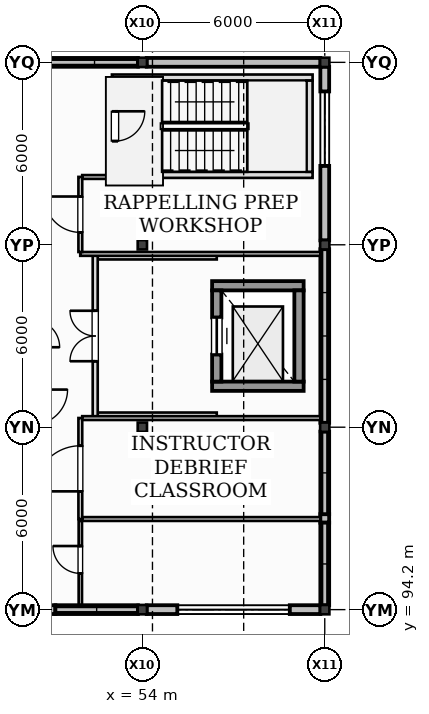
"""IFC4 building model, lengths in metres.
Left out: names, types, materials, properties, quantities, classifications, styles, units other than length and angle.
Written with IfcOpenShell. Run it as: python <this file> out.ifc"""

import sys

from ifc_helpers import new_model, si_unit, direction, frame, frame_2d, origin, origin_2d, place, context, subcontext, project, spatial, rectangle, i_section, extrude, element, fill, save


model = new_model("IFC4")
c1 = context("Model", 3, precision=1e-05, world=origin(), true_north=direction((0.0, 1.0)))
c2 = subcontext(c1, "Body", "Model", "MODEL_VIEW")
j1 = project(units=[si_unit("LENGTHUNIT", "METRE"), si_unit("PLANEANGLEUNIT", "RADIAN")], contexts=[c1])
p1 = place(None, origin())
s1 = spatial("IfcSite", under=j1, at=p1, CompositionType="ELEMENT")
p2 = place(p1, origin())
s2 = spatial("IfcBuilding", under=s1, at=p2, CompositionType="ELEMENT")
p3 = place(p2, frame((0.0, 0.0, 21.6)))
s3 = spatial("IfcBuildingStorey", under=s2, at=p3, CompositionType="ELEMENT", Elevation=21.6)
for number, where, z_axis, x_axis in (
    (1, (54.0, 94.2, 0.0), (0.0, 0.0, 1.0), (1.0, 0.0, 0.0)),
    (2, (54.0, 100.2, 0.0), (0.0, 0.0, 1.0), (1.0, 0.0, 0.0)),
    (3, (54.0, 106.2, 0.0), (0.0, 0.0, 1.0), (1.0, 0.0, 0.0)),
    (4, (54.0, 112.2, 0.0), (0.0, 0.0, 1.0), (1.0, 0.0, 0.0)),
    (5, (60.0, 94.2, 0.0), (0.0, 0.0, 1.0), (1.0, 0.0, 0.0)),
    (6, (60.0, 100.2, 0.0), (0.0, 0.0, 1.0), (1.0, 0.0, 0.0)),
    (7, (60.0, 106.2, 0.0), (0.0, 0.0, 1.0), (1.0, 0.0, 0.0)),
    (8, (60.0, 112.2, 0.0), (0.0, 0.0, 1.0), (1.0, 0.0, 0.0)),
):
    element("IfcColumn", number, at=place(p3, frame(where, z_axis=z_axis, x_axis=x_axis)), inside=s3, PredefinedType="COLUMN", context=c2, shape_type="SweptSolid", body=[
        extrude(i_section(OverallWidth=0.305, OverallDepth=0.308, WebThickness=0.01, FlangeThickness=0.015, at=origin_2d()), origin(), (0.0, 0.0, 1.0), 3.6),
    ])
p4 = place(p3, frame((50.86, 94.2, 0.0), z_axis=(0.0, 0.0, 1.0), x_axis=(1.0, 0.0, 0.0)))
e9 = element("IfcWall", 9, at=p4, inside=s3, PredefinedType="STANDARD", context=c2, shape_type="SweptSolid", body=[
    extrude(rectangle(XDim=0.28, YDim=0.29, at=frame_2d((0.14, 0.0))), origin(), (0.0, 0.0, 1.0), 3.6),
])
p5 = place(p3, frame((51.14, 94.2, 0.0), z_axis=(0.0, 0.0, 1.0), x_axis=(1.0, 0.0, 0.0)))
e10 = element("IfcWall", 10, at=p5, inside=s3, PredefinedType="STANDARD", context=c2, shape_type="SweptSolid", body=[
    extrude(rectangle(XDim=2.715, YDim=0.29, at=frame_2d((1.357, 0.0))), origin(), (0.0, 0.0, 1.0), 0.56),
])
p6 = place(p3, frame((54.145, 94.2, 0.0), z_axis=(0.0, 0.0, 1.0), x_axis=(1.0, 0.0, 0.0)))
e11 = element("IfcWall", 11, at=p6, inside=s3, PredefinedType="STANDARD", context=c2, shape_type="SweptSolid", body=[
    extrude(rectangle(XDim=5.71, YDim=0.29, at=frame_2d((2.855, 0.0))), origin(), (0.0, 0.0, 1.0), 3.6),
])
p7 = place(p6, frame((1.005, 0.0, 1.0)))
e12 = element("IfcOpeningElement", 12, at=p7, cuts=e11, PredefinedType="OPENING", context=c2, shape_type="SweptSolid", body=[
    extrude(rectangle(XDim=3.7, YDim=0.88, at=frame_2d((1.85, 0.44))), frame((0.0, 0.155, 0.0), z_axis=(0.0, -1.0, 0.0), x_axis=(1.0, 0.0, 0.0)), (0.0, 0.0, 1.0), 0.31),
])
p8 = place(p3, frame((53.855, 112.2, 0.0), z_axis=(0.0, 0.0, 1.0), x_axis=(-1.0, 0.0, 0.0)))
e13 = element("IfcWall", 13, at=p8, inside=s3, PredefinedType="STANDARD", context=c2, shape_type="SweptSolid", body=[
    extrude(rectangle(XDim=5.71, YDim=0.29, at=frame_2d((2.855, 0.0))), origin(), (0.0, 0.0, 1.0), 0.92),
])
p9 = place(p3, frame((59.855, 112.2, 0.0), z_axis=(0.0, 0.0, 1.0), x_axis=(-1.0, 0.0, 0.0)))
e14 = element("IfcWall", 14, at=p9, inside=s3, PredefinedType="STANDARD", context=c2, shape_type="SweptSolid", body=[
    extrude(rectangle(XDim=5.71, YDim=0.29, at=frame_2d((2.855, 0.0))), origin(), (0.0, 0.0, 1.0), 3.6),
])
p10 = place(p3, frame((60.0, 97.06, 0.0), z_axis=(0.0, 0.0, 1.0), x_axis=(0.0, 1.0, 0.0)))
e15 = element("IfcWall", 15, at=p10, inside=s3, PredefinedType="STANDARD", context=c2, shape_type="SweptSolid", body=[
    extrude(rectangle(XDim=0.28, YDim=0.29, at=frame_2d((0.14, 0.0))), origin(), (0.0, 0.0, 1.0), 2.813),
])
p11 = place(p3, frame((60.0, 94.345, 0.0), z_axis=(0.0, 0.0, 1.0), x_axis=(0.0, 1.0, 0.0)))
e16 = element("IfcWall", 16, at=p11, inside=s3, PredefinedType="STANDARD", context=c2, shape_type="SweptSolid", body=[
    extrude(rectangle(XDim=2.715, YDim=0.29, at=frame_2d((1.357, 0.0))), origin(), (0.0, 0.0, 1.0), 0.56),
])
p12 = place(p3, frame((60.0, 97.34, 0.0), z_axis=(0.0, 0.0, 1.0), x_axis=(0.0, 1.0, 0.0)))
e17 = element("IfcWall", 17, at=p12, inside=s3, PredefinedType="STANDARD", context=c2, shape_type="SweptSolid", body=[
    extrude(rectangle(XDim=2.715, YDim=0.29, at=frame_2d((1.357, 0.0))), origin(), (0.0, 0.0, 1.0), 0.68),
])
p13 = place(p3, frame((60.0, 100.345, 0.0), z_axis=(0.0, 0.0, 1.0), x_axis=(0.0, 1.0, 0.0)))
e18 = element("IfcWall", 18, at=p13, inside=s3, PredefinedType="STANDARD", context=c2, shape_type="SweptSolid", body=[
    extrude(rectangle(XDim=5.71, YDim=0.29, at=frame_2d((2.855, 0.0))), origin(), (0.0, 0.0, 1.0), 0.8),
])
p14 = place(p3, frame((60.0, 106.345, 0.0), z_axis=(0.0, 0.0, 1.0), x_axis=(0.0, 1.0, 0.0)))
e19 = element("IfcWall", 19, at=p14, inside=s3, PredefinedType="STANDARD", context=c2, shape_type="SweptSolid", body=[
    extrude(rectangle(XDim=5.71, YDim=0.29, at=frame_2d((2.855, 0.0))), origin(), (0.0, 0.0, 1.0), 3.6),
])
p15 = place(p14, frame((2.449, 0.0, 1.0)))
e20 = element("IfcOpeningElement", 20, at=p15, cuts=e19, PredefinedType="OPENING", context=c2, shape_type="SweptSolid", body=[
    extrude(rectangle(XDim=2.45, YDim=1.08, at=frame_2d((1.225, 0.54))), frame((0.0, 0.155, 0.0), z_axis=(0.0, -1.0, 0.0), x_axis=(1.0, 0.0, 0.0)), (0.0, 0.0, 1.0), 0.31),
])
for number, where, z_axis, x_axis in (
    (21, (53.0, 108.5, 0.0), (0.0, 0.0, 1.0), (1.0, 0.0, 0.0)),
    (22, (59.6, 111.7, 0.0), (0.0, 0.0, 1.0), (-1.0, 0.0, 0.0)),
):
    element("IfcWall", number, at=place(p3, frame(where, z_axis=z_axis, x_axis=x_axis)), inside=s3, PredefinedType="PARTITIONING", context=c2, shape_type="SweptSolid", body=[
        extrude(rectangle(XDim=6.6, YDim=0.2, at=frame_2d((3.3, 0.0))), origin(), (0.0, 0.0, 1.0), 2.89),
    ])
p16 = place(p3, frame((53.1, 111.6, 0.0), z_axis=(0.0, 0.0, 1.0), x_axis=(0.0, -1.0, 0.0)))
e23 = element("IfcWall", 23, at=p16, inside=s3, PredefinedType="PARTITIONING", context=c2, shape_type="SweptSolid", body=[
    extrude(rectangle(XDim=3.0, YDim=0.2, at=frame_2d((1.5, 0.0))), origin(), (0.0, 0.0, 1.0), 2.89),
])
p17 = place(p16, frame((1.01, 0.0, 0.0)))
e24 = element("IfcOpeningElement", 24, at=p17, cuts=e23, PredefinedType="OPENING", context=c2, shape_type="SweptSolid", body=[
    extrude(rectangle(XDim=0.98, YDim=2.15, at=frame_2d((0.49, 1.075))), frame((0.0, 0.11, 0.0), z_axis=(0.0, -1.0, 0.0), x_axis=(1.0, 0.0, 0.0)), (0.0, 0.0, 1.0), 0.22),
])
p18 = place(p3, frame((59.5, 108.6, 0.0), z_axis=(0.0, 0.0, 1.0), x_axis=(0.0, 1.0, 0.0)))
e25 = element("IfcWall", 25, at=p18, inside=s3, PredefinedType="PARTITIONING", context=c2, shape_type="SweptSolid", body=[
    extrude(rectangle(XDim=3.0, YDim=0.2, at=frame_2d((1.5, 0.0))), origin(), (0.0, 0.0, 1.0), 2.89),
])
for number, where, z_axis, x_axis in (
    (26, (56.295, 101.548, 0.0), (0.0, 0.0, 1.0), (1.0, 0.0, 0.0)),
    (27, (59.305, 104.853, 0.0), (0.0, 0.0, 1.0), (-1.0, 0.0, 0.0)),
):
    element("IfcWall", number, at=place(p3, frame(where, z_axis=z_axis, x_axis=x_axis)), inside=s3, PredefinedType="SHEAR", context=c2, shape_type="SweptSolid", body=[
        extrude(rectangle(XDim=3.01, YDim=0.305, at=frame_2d((1.505, 0.0))), origin(), (0.0, 0.0, 1.0), 3.25),
    ])
p19 = place(p3, frame((56.448, 104.7, 0.0), z_axis=(0.0, 0.0, 1.0), x_axis=(0.0, -1.0, 0.0)))
e28 = element("IfcWall", 28, at=p19, inside=s3, PredefinedType="SHEAR", context=c2, shape_type="SweptSolid", body=[
    extrude(rectangle(XDim=3.0, YDim=0.305, at=frame_2d((1.5, 0.0))), origin(), (0.0, 0.0, 1.0), 3.25),
])
p20 = place(p19, frame((0.89, 0.0, 0.0)))
e29 = element("IfcOpeningElement", 29, at=p20, cuts=e28, PredefinedType="OPENING", context=c2, shape_type="SweptSolid", body=[
    extrude(rectangle(XDim=1.22, YDim=2.22, at=frame_2d((0.61, 1.11))), frame((0.0, 0.162, 0.0), z_axis=(0.0, -1.0, 0.0), x_axis=(1.0, 0.0, 0.0)), (0.0, 0.0, 1.0), 0.325),
])
p21 = place(p3, frame((59.153, 101.7, 0.0), z_axis=(0.0, 0.0, 1.0), x_axis=(0.0, 1.0, 0.0)))
e30 = element("IfcWall", 30, at=p21, inside=s3, PredefinedType="SHEAR", context=c2, shape_type="SweptSolid", body=[
    extrude(rectangle(XDim=3.0, YDim=0.305, at=frame_2d((1.5, 0.0))), origin(), (0.0, 0.0, 1.0), 3.25),
])
for number, where, z_axis, x_axis in (
    (31, (52.45, 100.6, 0.0), (0.0, 0.0, 1.0), (1.0, 0.0, 0.0)),
    (32, (56.448, 105.8, 0.0), (0.0, 0.0, 1.0), (-1.0, 0.0, 0.0)),
):
    element("IfcWall", number, at=place(p3, frame(where, z_axis=z_axis, x_axis=x_axis)), inside=s3, PredefinedType="PARTITIONING", context=c2, shape_type="SweptSolid", body=[
        extrude(rectangle(XDim=3.998, YDim=0.165, at=frame_2d((1.999, 0.0))), origin(), (0.0, 0.0, 1.0), 3.18),
    ])
p22 = place(p3, frame((52.45, 100.52, 0.0), z_axis=(0.0, 0.0, 1.0), x_axis=(0.0, 1.0, 0.0)))
e33 = element("IfcWall", 33, at=p22, inside=s3, PredefinedType="PARTITIONING", context=c2, shape_type="SweptSolid", body=[
    extrude(rectangle(XDim=5.36, YDim=0.165, at=frame_2d((2.68, 0.0))), origin(), (0.0, 0.0, 1.0), 3.18),
])
p23 = place(p22, frame((1.85, 0.0, 0.0)))
e34 = element("IfcOpeningElement", 34, at=p23, cuts=e33, PredefinedType="OPENING", context=c2, shape_type="SweptSolid", body=[
    extrude(rectangle(XDim=1.66, YDim=2.2, at=frame_2d((0.83, 1.1))), frame((0.0, 0.093, 0.0), z_axis=(0.0, -1.0, 0.0), x_axis=(1.0, 0.0, 0.0)), (0.0, 0.0, 1.0), 0.185),
])
p24 = place(p3, frame((59.855, 105.9, 0.0), z_axis=(0.0, 0.0, 1.0), x_axis=(-1.0, 0.0, 0.0)))
e35 = element("IfcWall", 35, at=p24, inside=s3, PredefinedType="PARTITIONING", context=c2, shape_type="SweptSolid", body=[
    extrude(rectangle(XDim=7.897, YDim=0.125, at=frame_2d((3.949, 0.0))), origin(), (0.0, 0.0, 1.0), 2.89),
])
p25 = place(p3, frame((51.96, 105.962, 0.0), z_axis=(0.0, 0.0, 1.0), x_axis=(0.0, 1.0, 0.0)))
e36 = element("IfcWall", 36, at=p25, inside=s3, PredefinedType="PARTITIONING", context=c2, shape_type="SweptSolid", body=[
    extrude(rectangle(XDim=2.47, YDim=0.125, at=frame_2d((1.235, 0.0))), origin(), (0.0, 0.0, 1.0), 3.18),
])
p26 = place(p25, frame((0.645, 0.0, 0.0)))
e37 = element("IfcOpeningElement", 37, at=p26, cuts=e36, PredefinedType="OPENING", context=c2, shape_type="SweptSolid", body=[
    extrude(rectangle(XDim=1.18, YDim=2.16, at=frame_2d((0.59, 1.08))), frame((0.0, 0.073, 0.0), z_axis=(0.0, -1.0, 0.0), x_axis=(1.0, 0.0, 0.0)), (0.0, 0.0, 1.0), 0.145),
])
p27 = place(p3, frame((52.022, 108.43, 0.0), z_axis=(0.0, 0.0, 1.0), x_axis=(1.0, 0.0, 0.0)))
e38 = element("IfcWall", 38, at=p27, inside=s3, PredefinedType="PARTITIONING", context=c2, shape_type="SweptSolid", body=[
    extrude(rectangle(XDim=0.978, YDim=0.125, at=frame_2d((0.489, 0.0))), origin(), (0.0, 0.0, 1.0), 3.18),
])
p28 = place(p3, frame((51.96, 97.177, 0.0), z_axis=(0.0, 0.0, 1.0), x_axis=(0.0, 1.0, 0.0)))
e39 = element("IfcWall", 39, at=p28, inside=s3, PredefinedType="PARTITIONING", context=c2, shape_type="SweptSolid", body=[
    extrude(rectangle(XDim=3.325, YDim=0.125, at=frame_2d((1.663, 0.0))), origin(), (0.0, 0.0, 1.0), 3.18),
])
p29 = place(p28, frame((0.913, 0.0, 0.0)))
e40 = element("IfcOpeningElement", 40, at=p29, cuts=e39, PredefinedType="OPENING", context=c2, shape_type="SweptSolid", body=[
    extrude(rectangle(XDim=1.5, YDim=2.22, at=frame_2d((0.75, 1.11))), frame((0.0, 0.073, 0.0), z_axis=(0.0, -1.0, 0.0), x_axis=(1.0, 0.0, 0.0)), (0.0, 0.0, 1.0), 0.145),
])
for number, where, z_axis, x_axis in (
    (41, (52.022, 100.5, 0.0), (0.0, 0.0, 1.0), (1.0, 0.0, 0.0)),
    (42, (59.855, 97.18, 0.0), (0.0, 0.0, 1.0), (-1.0, 0.0, 0.0)),
):
    element("IfcWall", number, at=place(p3, frame(where, z_axis=z_axis, x_axis=x_axis)), inside=s3, PredefinedType="PARTITIONING", context=c2, shape_type="SweptSolid", body=[
        extrude(rectangle(XDim=7.833, YDim=0.125, at=frame_2d((3.916, 0.0))), origin(), (0.0, 0.0, 1.0), 3.18),
    ])
p30 = place(p3, frame((51.96, 94.345, 0.0), z_axis=(0.0, 0.0, 1.0), x_axis=(0.0, 1.0, 0.0)))
e43 = element("IfcWall", 43, at=p30, inside=s3, PredefinedType="PARTITIONING", context=c2, shape_type="SweptSolid", body=[
    extrude(rectangle(XDim=2.772, YDim=0.11, at=frame_2d((1.386, 0.0))), origin(), (0.0, 0.0, 1.0), 3.18),
])
p31 = place(p30, frame((1.047, 0.0, 0.0)))
e44 = element("IfcOpeningElement", 44, at=p31, cuts=e43, PredefinedType="OPENING", context=c2, shape_type="SweptSolid", body=[
    extrude(rectangle(XDim=0.9, YDim=2.1, at=frame_2d((0.45, 1.05))), frame((0.0, 0.065, 0.0), z_axis=(0.0, -1.0, 0.0), x_axis=(1.0, 0.0, 0.0)), (0.0, 0.0, 1.0), 0.13),
])
p32 = place(p7, origin())
e45 = element("IfcWindow", 45, at=p32, inside=s3, PartitioningType="SINGLE_PANEL", PredefinedType="WINDOW", context=c2, shape_type="SweptSolid", body=[
    extrude(rectangle(XDim=3.7, YDim=0.88, at=frame_2d((1.85, 0.44))), frame((0.0, 0.03, 0.0), z_axis=(0.0, -1.0, 0.0), x_axis=(1.0, 0.0, 0.0)), (0.0, 0.0, 1.0), 0.06),
])
fill(e12, e45)
p33 = place(p15, origin())
e46 = element("IfcWindow", 46, at=p33, inside=s3, PartitioningType="SINGLE_PANEL", PredefinedType="WINDOW", context=c2, shape_type="SweptSolid", body=[
    extrude(rectangle(XDim=2.45, YDim=1.08, at=frame_2d((1.225, 0.54))), frame((0.0, 0.03, 0.0), z_axis=(0.0, -1.0, 0.0), x_axis=(1.0, 0.0, 0.0)), (0.0, 0.0, 1.0), 0.06),
])
fill(e20, e46)
p34 = place(p2, frame((0.0, 0.0, 25.2)))
p35 = place(p34, frame((0.0, 0.0, -0.42)))
p36 = place(p35, frame((51.5, 107.7, -0.01)))
p37 = place(p36, frame((0.0, 0.0, 0.37)))
e47 = element("IfcWindow", 47, at=p37, inside=s3, PartitioningType="SINGLE_PANEL", PredefinedType="SKYLIGHT", context=c2, shape_type="SweptSolid", body=[
    extrude(rectangle(XDim=1.95, YDim=1.48, at=origin_2d()), origin(), (0.0, 0.0, 1.0), 0.06),
])
p38 = place(p35, frame((55.5, 107.15, -0.01)))
p39 = place(p38, frame((0.0, 0.0, 0.37)))
e48 = element("IfcWindow", 48, at=p39, inside=s3, PartitioningType="SINGLE_PANEL", PredefinedType="SKYLIGHT", context=c2, shape_type="SweptSolid", body=[
    extrude(rectangle(XDim=2.15, YDim=1.62, at=origin_2d()), origin(), (0.0, 0.0, 1.0), 0.06),
])
p40 = place(p17, origin())
e49 = element("IfcDoor", 49, at=p40, inside=s3, OperationType="SINGLE_SWING_LEFT", PredefinedType="DOOR", context=c2, shape_type="SweptSolid", body=[
    extrude(rectangle(XDim=0.98, YDim=2.15, at=frame_2d((0.49, 1.075))), frame((0.0, 0.025, 0.0), z_axis=(0.0, -1.0, 0.0), x_axis=(1.0, 0.0, 0.0)), (0.0, 0.0, 1.0), 0.05),
])
fill(e24, e49)
p41 = place(p20, origin())
e50 = element("IfcDoor", 50, at=p41, inside=s3, OperationType="SLIDING_TO_LEFT", PredefinedType="DOOR", context=c2, shape_type="SweptSolid", body=[
    extrude(rectangle(XDim=1.22, YDim=2.22, at=frame_2d((0.61, 1.11))), frame((0.0, 0.025, 0.0), z_axis=(0.0, -1.0, 0.0), x_axis=(1.0, 0.0, 0.0)), (0.0, 0.0, 1.0), 0.05),
])
fill(e29, e50)
p42 = place(p23, frame((1.66, 0.0, 0.0), z_axis=(0.0, 0.0, 1.0), x_axis=(-1.0, 0.0, 0.0)))
e51 = element("IfcDoor", 51, at=p42, inside=s3, OperationType="DOUBLE_DOOR_SINGLE_SWING", PredefinedType="DOOR", context=c2, shape_type="SweptSolid", body=[
    extrude(rectangle(XDim=1.66, YDim=2.2, at=frame_2d((0.83, 1.1))), frame((0.0, 0.025, 0.0), z_axis=(0.0, -1.0, 0.0), x_axis=(1.0, 0.0, 0.0)), (0.0, 0.0, 1.0), 0.05),
])
fill(e34, e51)
p43 = place(p26, frame((1.18, 0.0, 0.0), z_axis=(0.0, 0.0, 1.0), x_axis=(-1.0, 0.0, 0.0)))
e52 = element("IfcDoor", 52, at=p43, inside=s3, OperationType="SINGLE_SWING_RIGHT", PredefinedType="DOOR", context=c2, shape_type="SweptSolid", body=[
    extrude(rectangle(XDim=1.18, YDim=2.16, at=frame_2d((0.59, 1.08))), frame((0.0, 0.025, 0.0), z_axis=(0.0, -1.0, 0.0), x_axis=(1.0, 0.0, 0.0)), (0.0, 0.0, 1.0), 0.05),
])
fill(e37, e52)
p44 = place(p29, frame((1.5, 0.0, 0.0), z_axis=(0.0, 0.0, 1.0), x_axis=(-1.0, 0.0, 0.0)))
e53 = element("IfcDoor", 53, at=p44, inside=s3, OperationType="SINGLE_SWING_LEFT", PredefinedType="DOOR", context=c2, shape_type="SweptSolid", body=[
    extrude(rectangle(XDim=1.5, YDim=2.22, at=frame_2d((0.75, 1.11))), frame((0.0, 0.025, 0.0), z_axis=(0.0, -1.0, 0.0), x_axis=(1.0, 0.0, 0.0)), (0.0, 0.0, 1.0), 0.05),
])
fill(e40, e53)
p45 = place(p31, frame((0.9, 0.0, 0.0), z_axis=(0.0, 0.0, 1.0), x_axis=(-1.0, 0.0, 0.0)))
e54 = element("IfcDoor", 54, at=p45, inside=s3, OperationType="SINGLE_SWING_RIGHT", PredefinedType="DOOR", context=c2, shape_type="SweptSolid", body=[
    extrude(rectangle(XDim=0.9, YDim=2.1, at=frame_2d((0.45, 1.05))), frame((0.0, 0.025, 0.0), z_axis=(0.0, -1.0, 0.0), x_axis=(1.0, 0.0, 0.0)), (0.0, 0.0, 1.0), 0.05),
])
fill(e44, e54)
save(model, sys.argv[1])
